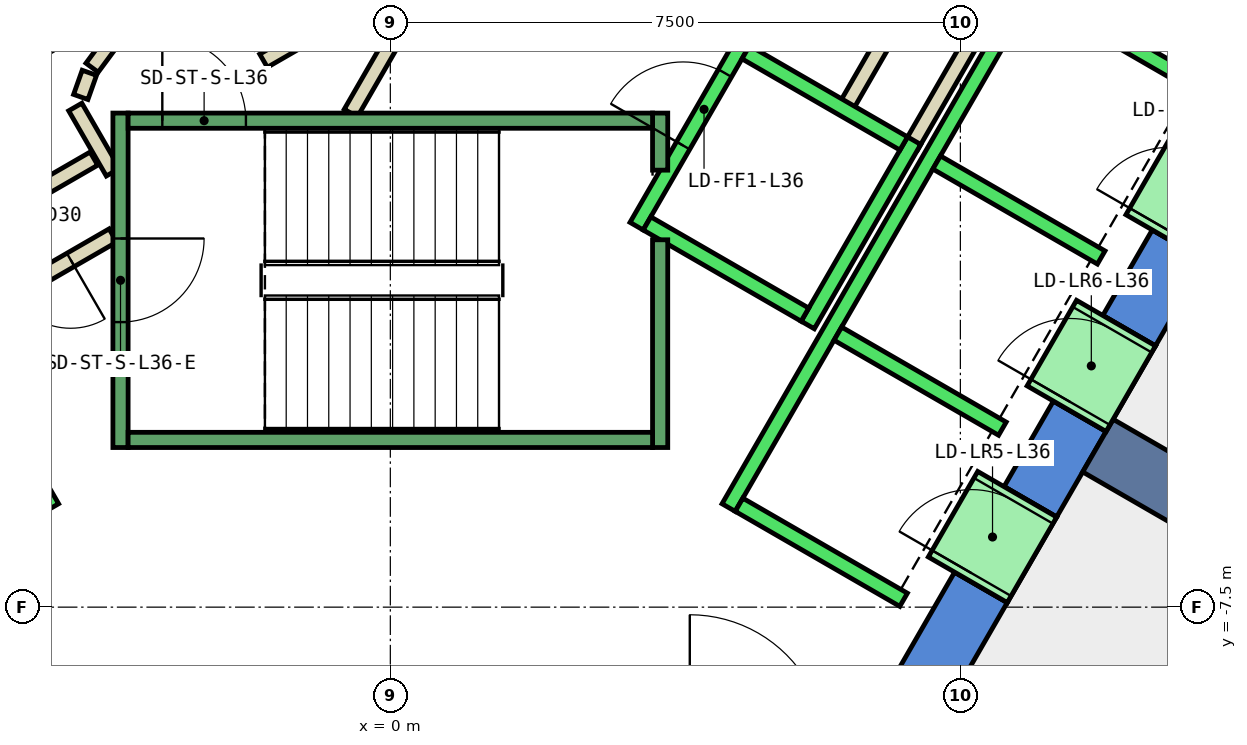
"""IFC4 building model, lengths in metres.
Left out: names, types, materials, properties, quantities, classifications, styles, units other than length and angle.
Written with IfcOpenShell. Run it as: python <this file> out.ifc"""

import sys

from ifc_helpers import new_model, si_unit, direction, frame, frame_2d, origin, place, context, subcontext, project, spatial, polyline, rectangle, outline, extrude, element, fill, save


model = new_model("IFC4")
c1 = context("Model", 3, precision=1e-05, world=origin(), true_north=direction((0.0, 1.0)))
c2 = subcontext(c1, "Body", "Model", "MODEL_VIEW")
j1 = project(units=[si_unit("LENGTHUNIT", "METRE"), si_unit("PLANEANGLEUNIT", "RADIAN")], contexts=[c1])
p1 = place(None, origin())
s1 = spatial("IfcSite", under=j1, at=p1, CompositionType="ELEMENT")
p2 = place(p1, origin())
s2 = spatial("IfcBuilding", under=s1, at=p2, CompositionType="ELEMENT")
p3 = place(p2, frame((0.0, 0.0, 163.4)))
s3 = spatial("IfcBuildingStorey", under=s2, at=p3, CompositionType="ELEMENT", Elevation=163.4)
p4 = place(p3, frame((0.0, 0.0, -0.4)))
e1 = element("IfcWall", 1, at=p4, inside=s3, PredefinedType="SHEAR", context=c2, shape_type="SweptSolid", body=[
    extrude(outline(polyline([(8.117, -7.44), (7.424, -7.04), (6.466, -8.7), (6.928, -9.5), (8.117, -7.44)])), origin(), (0.0, 0.0, 1.0), 4.2),
])
p5 = place(p3, frame((0.0, 0.0, -0.4)))
e2 = element("IfcWall", 2, at=p5, inside=s3, PredefinedType="SHEAR", context=c2, shape_type="SweptSolid", body=[
    extrude(outline(polyline([(9.417, -5.189), (8.724, -4.789), (8.075, -5.914), (8.767, -6.314), (9.417, -5.189)])), origin(), (0.0, 0.0, 1.0), 4.2),
])
p6 = place(p3, frame((0.0, 0.0, -0.4)))
e3 = element("IfcWall", 3, at=p6, inside=s3, PredefinedType="SHEAR", context=c2, shape_type="SweptSolid", body=[
    extrude(outline(polyline([(10.717, -2.937), (10.025, -2.537), (9.374, -3.663), (10.067, -4.063), (10.717, -2.937)])), origin(), (0.0, 0.0, 1.0), 4.2),
])
p7 = place(p3, frame((0.0, 0.0, 3.6)))
e4 = element("IfcWall", 4, at=p7, inside=s3, PredefinedType="SHEAR", context=c2, shape_type="SweptSolid", body=[
    extrude(outline(polyline([(8.767, -6.314), (8.075, -5.914), (7.424, -7.04), (8.117, -7.44), (8.767, -6.314)])), origin(), (0.0, 0.0, 1.0), 0.2),
])
p8 = place(p3, frame((0.0, 0.0, 3.6)))
e5 = element("IfcWall", 5, at=p8, inside=s3, PredefinedType="SHEAR", context=c2, shape_type="SweptSolid", body=[
    extrude(outline(polyline([(10.067, -4.063), (9.374, -3.663), (8.724, -4.789), (9.417, -5.189), (10.067, -4.063)])), origin(), (0.0, 0.0, 1.0), 0.2),
])
p9 = place(p3, frame((0.0, 0.0, 3.6)))
e6 = element("IfcWall", 6, at=p9, inside=s3, PredefinedType="SHEAR", context=c2, shape_type="SweptSolid", body=[
    extrude(outline(polyline([(11.367, -1.811), (10.675, -1.411), (10.025, -2.537), (10.717, -2.937), (11.367, -1.811)])), origin(), (0.0, 0.0, 1.0), 0.2),
])
p10 = place(p3, frame((9.31, -5.375, -0.4), z_axis=(0.0, 0.0, 1.0), x_axis=(0.866017533419, -0.500013631625, 0.0)))
e7 = element("IfcWall", 7, at=p10, inside=s3, PredefinedType="SHEAR", context=c2, shape_type="SweptSolid", body=[
    extrude(rectangle(XDim=9.0, YDim=0.8, at=frame_2d((4.5, 0.0))), origin(), (0.0, 0.0, 1.0), 4.2),
])
p11 = place(p3, frame((6.826, 0.522, 0.0), z_axis=(0.0, 0.0, 1.0), x_axis=(-0.500016722714, -0.866015748706, 0.0)))
e8 = element("IfcWall", 8, at=p11, inside=s3, PredefinedType="PARTITIONING", context=c2, shape_type="SweptSolid", body=[
    extrude(rectangle(XDim=1.7, YDim=0.2, at=frame_2d((0.85, 0.0))), origin(), (0.0, 0.0, 1.0), 3.8),
])
p12 = place(p3, frame((8.192, 0.888, 0.0), z_axis=(0.0, 0.0, 1.0), x_axis=(-0.499940625693, -0.866059680843, 0.0)))
e9 = element("IfcWall", 9, at=p12, inside=s3, PredefinedType="PARTITIONING", context=c2, shape_type="SweptSolid", body=[
    extrude(rectangle(XDim=2.68, YDim=0.2, at=frame_2d((1.34, 0.0))), origin(), (0.0, 0.0, 1.0), 3.8),
])
p13 = place(p3, frame((-3.9, -1.599, 0.0), z_axis=(0.0, 0.0, 1.0), x_axis=(-0.865969445389, -0.500096910261, 0.0)))
e10 = element("IfcWall", 10, at=p13, inside=s3, PredefinedType="PARTITIONING", context=c2, shape_type="SweptSolid", body=[
    extrude(rectangle(XDim=1.373, YDim=0.2, at=frame_2d((0.687, 0.0))), origin(), (0.0, 0.0, 1.0), 3.8),
])
p14 = place(p3, frame((-3.65, -2.61, 0.0), z_axis=(0.0, 0.0, 1.0), x_axis=(-0.866072462134, -0.499918483688, 0.0)))
e11 = element("IfcWall", 11, at=p14, inside=s3, PredefinedType="PARTITIONING", context=c2, shape_type="SweptSolid", body=[
    extrude(rectangle(XDim=2.084, YDim=0.2, at=frame_2d((1.042, 0.0))), origin(), (0.0, 0.0, 1.0), 3.8),
])
p15 = place(p14, frame((0.642, 0.0, 0.0)))
e12 = element("IfcOpeningElement", 12, at=p15, cuts=e11, PredefinedType="OPENING", context=c2, shape_type="SweptSolid", body=[
    extrude(rectangle(XDim=0.9, YDim=2.1, at=frame_2d((0.45, 1.05))), frame((0.0, 0.11, 0.0), z_axis=(0.0, -1.0, 0.0), x_axis=(1.0, 0.0, 0.0)), (0.0, 0.0, 1.0), 0.22),
])
p16 = place(p3, frame((-4.145, -0.92, 0.0), z_axis=(0.0, 0.0, 1.0), x_axis=(0.499743786207, -0.866173278362, 0.0)))
e13 = element("IfcWall", 13, at=p16, inside=s3, PredefinedType="PARTITIONING", context=c2, shape_type="SweptSolid", body=[
    extrude(rectangle(XDim=0.991, YDim=0.2, at=frame_2d((0.495, 0.0))), origin(), (0.0, 0.0, 1.0), 3.8),
])
p17 = place(p3, frame((-0.52, -1.0, 0.0), z_axis=(0.0, 0.0, 1.0), x_axis=(0.50011622646, 0.865958290007, 0.0)))
e14 = element("IfcWall", 14, at=p17, inside=s3, PredefinedType="PARTITIONING", context=c2, shape_type="SweptSolid", body=[
    extrude(rectangle(XDim=4.991, YDim=0.2, at=frame_2d((2.496, 0.0))), origin(), (0.0, 0.0, 1.0), 3.8),
])
p18 = place(p17, frame((1.945, 0.0, 0.0)))
e15 = element("IfcOpeningElement", 15, at=p18, cuts=e14, PredefinedType="OPENING", context=c2, shape_type="SweptSolid", body=[
    extrude(rectangle(XDim=1.0, YDim=2.1, at=frame_2d((0.5, 1.05))), frame((0.0, 0.11, 0.0), z_axis=(0.0, -1.0, 0.0), x_axis=(1.0, 0.0, 0.0)), (0.0, 0.0, 1.0), 0.22),
])
p19 = place(p3, frame((-0.412, 0.414, 0.0), z_axis=(0.0, 0.0, 1.0), x_axis=(-0.866017369001, -0.500013916395, 0.0)))
e16 = element("IfcWall", 16, at=p19, inside=s3, PredefinedType="PARTITIONING", context=c2, shape_type="SweptSolid", body=[
    extrude(rectangle(XDim=1.45, YDim=0.2, at=frame_2d((0.725, 0.0))), origin(), (0.0, 0.0, 1.0), 3.8),
])
p20 = place(p3, frame((-3.723, -0.131, 0.0), z_axis=(0.0, 0.0, 1.0), x_axis=(-0.594675113454, -0.803966112121, 0.0)))
e17 = element("IfcWall", 17, at=p20, inside=s3, PredefinedType="PARTITIONING", context=c2, shape_type="SweptSolid", body=[
    extrude(rectangle(XDim=0.338, YDim=0.2, at=frame_2d((0.169, 0.0))), origin(), (0.0, 0.0, 1.0), 3.8),
])
p21 = place(p3, frame((-3.96, -0.47, 0.0), z_axis=(0.0, 0.0, 1.0), x_axis=(-0.334824194261, -0.942280615813, 0.0)))
e18 = element("IfcWall", 18, at=p21, inside=s3, PredefinedType="PARTITIONING", context=c2, shape_type="SweptSolid", body=[
    extrude(rectangle(XDim=0.338, YDim=0.2, at=frame_2d((0.169, 0.0))), origin(), (0.0, 0.0, 1.0), 3.8),
])
p22 = place(p3, frame((12.401, -7.621, 0.0), z_axis=(0.0, 0.0, 1.0), x_axis=(-0.499983724212, -0.866034800411, 0.0)))
e19 = element("IfcWall", 19, at=p22, inside=s3, PredefinedType="PARTITIONING", context=c2, shape_type="SweptSolid", body=[
    extrude(rectangle(XDim=9.302, YDim=0.2, at=frame_2d((4.651, 0.0))), origin(), (0.0, 0.0, 1.0), 3.8),
])
p23 = place(p3, frame((-9.751, 2.99, 0.0), z_axis=(0.0, 0.0, 1.0), x_axis=(0.50000090737, -0.866024879913, 0.0)))
e20 = element("IfcWall", 20, at=p23, inside=s3, PredefinedType="STANDARD", context=c2, shape_type="SweptSolid", body=[
    extrude(rectangle(XDim=10.6, YDim=0.2, at=frame_2d((5.3, 0.0))), origin(), (0.0, 0.0, 1.0), 3.8),
])
p24 = place(p3, frame((3.24, -2.488, 0.0), z_axis=(0.0, 0.0, 1.0), x_axis=(0.49994636267, 0.866056369097, 0.0)))
e21 = element("IfcWall", 21, at=p24, inside=s3, PredefinedType="STANDARD", context=c2, shape_type="SweptSolid", body=[
    extrude(rectangle(XDim=2.8, YDim=0.2, at=frame_2d((1.4, 0.0))), origin(), (0.0, 0.0, 1.0), 3.8),
])
p25 = place(p24, frame((1.225, 0.0, 0.0)))
e22 = element("IfcOpeningElement", 22, at=p25, cuts=e21, PredefinedType="OPENING", context=c2, shape_type="SweptSolid", body=[
    extrude(rectangle(XDim=1.1, YDim=2.1, at=frame_2d((0.55, 1.05))), frame((0.0, 0.11, 0.0), z_axis=(0.0, -1.0, 0.0), x_axis=(1.0, 0.0, 0.0)), (0.0, 0.0, 1.0), 0.22),
])
p26 = place(p3, frame((5.492, -3.788, 0.0), z_axis=(0.0, 0.0, 1.0), x_axis=(0.500011755427, 0.866018616679, 0.0)))
e23 = element("IfcWall", 23, at=p26, inside=s3, PredefinedType="STANDARD", context=c2, shape_type="SweptSolid", body=[
    extrude(rectangle(XDim=2.8, YDim=0.2, at=frame_2d((1.4, 0.0))), origin(), (0.0, 0.0, 1.0), 3.8),
])
p27 = place(p3, frame((3.377, -2.452, 0.0), z_axis=(0.0, 0.0, 1.0), x_axis=(0.865955154139, -0.50012165622, 0.0)))
e24 = element("IfcWall", 24, at=p27, inside=s3, PredefinedType="STANDARD", context=c2, shape_type="SweptSolid", body=[
    extrude(rectangle(XDim=2.4, YDim=0.2, at=frame_2d((1.2, 0.0))), origin(), (0.0, 0.0, 1.0), 3.8),
])
p28 = place(p3, frame((4.677, -0.2, 0.0), z_axis=(0.0, 0.0, 1.0), x_axis=(0.865973769406, -0.500089422704, 0.0)))
e25 = element("IfcWall", 25, at=p28, inside=s3, PredefinedType="STANDARD", context=c2, shape_type="SweptSolid", body=[
    extrude(rectangle(XDim=2.399, YDim=0.2, at=frame_2d((1.2, 0.0))), origin(), (0.0, 0.0, 1.0), 3.8),
])
p29 = place(p3, frame((4.451, -6.19, 0.0), z_axis=(0.0, 0.0, 1.0), x_axis=(0.50000090737, 0.866024879913, 0.0)))
e26 = element("IfcWall", 26, at=p29, inside=s3, PredefinedType="STANDARD", context=c2, shape_type="SweptSolid", body=[
    extrude(rectangle(XDim=10.6, YDim=0.2, at=frame_2d((5.3, 0.0))), origin(), (0.0, 0.0, 1.0), 3.8),
])
for number, where, z_axis, x_axis in (
    (27, (4.588, -6.153, 0.0), (0.0, 0.0, 1.0), (0.866, -0.5, 0.0)),
    (28, (5.888, -3.902, 0.0), (0.0, 0.0, 1.0), (0.866, -0.5, 0.0)),
    (29, (7.188, -1.65, 0.0), (0.0, 0.0, 1.0), (0.866, -0.5, 0.0)),
    (30, (8.488, 0.602, 0.0), (0.0, 0.0, 1.0), (0.866, -0.5, 0.0)),
):
    element("IfcWall", number, at=place(p3, frame(where, z_axis=z_axis, x_axis=x_axis)), inside=s3, PredefinedType="STANDARD", context=c2, shape_type="SweptSolid", body=[
        extrude(rectangle(XDim=2.5, YDim=0.2, at=frame_2d((1.25, 0.0))), origin(), (0.0, 0.0, 1.0), 3.8),
    ])
p30 = place(p3, frame((7.598, -7.14, 0.0), z_axis=(0.0, 0.0, 1.0), x_axis=(0.500362116554, 0.865816234728, 0.0)))
e31 = element("IfcWall", 31, at=p30, inside=s3, PredefinedType="STANDARD", context=c2, shape_type="SweptSolid", body=[
    extrude(rectangle(XDim=1.299, YDim=1.2, at=frame_2d((0.65, 0.0))), origin(), (0.0, 0.0, 1.0), 2.4),
])
p31 = place(p30, frame((0.1, 0.0, 0.0)))
e32 = element("IfcOpeningElement", 32, at=p31, cuts=e31, PredefinedType="OPENING", context=c2, shape_type="SweptSolid", body=[
    extrude(rectangle(XDim=1.1, YDim=2.3, at=frame_2d((0.55, 1.15))), frame((0.0, 0.61, 0.0), z_axis=(0.0, -1.0, 0.0), x_axis=(1.0, 0.0, 0.0)), (0.0, 0.0, 1.0), 1.22),
])
p32 = place(p3, frame((8.898, -4.889, 0.0), z_axis=(0.0, 0.0, 1.0), x_axis=(0.500036693733, 0.866004217611, 0.0)))
e33 = element("IfcWall", 33, at=p32, inside=s3, PredefinedType="STANDARD", context=c2, shape_type="SweptSolid", body=[
    extrude(rectangle(XDim=1.3, YDim=1.2, at=frame_2d((0.65, 0.0))), origin(), (0.0, 0.0, 1.0), 2.4),
])
p33 = place(p32, frame((0.1, 0.0, 0.0)))
e34 = element("IfcOpeningElement", 34, at=p33, cuts=e33, PredefinedType="OPENING", context=c2, shape_type="SweptSolid", body=[
    extrude(rectangle(XDim=1.1, YDim=2.3, at=frame_2d((0.55, 1.15))), frame((0.0, 0.61, 0.0), z_axis=(0.0, -1.0, 0.0), x_axis=(1.0, 0.0, 0.0)), (0.0, 0.0, 1.0), 1.22),
])
p34 = place(p3, frame((10.198, -2.637, 0.0), z_axis=(0.0, 0.0, 1.0), x_axis=(0.49989585183, 0.866085525409, 0.0)))
e35 = element("IfcWall", 35, at=p34, inside=s3, PredefinedType="STANDARD", context=c2, shape_type="SweptSolid", body=[
    extrude(rectangle(XDim=1.3, YDim=1.2, at=frame_2d((0.65, 0.0))), origin(), (0.0, 0.0, 1.0), 2.4),
])
p35 = place(p34, frame((0.1, 0.0, 0.0)))
e36 = element("IfcOpeningElement", 36, at=p35, cuts=e35, PredefinedType="OPENING", context=c2, shape_type="SweptSolid", body=[
    extrude(rectangle(XDim=1.1, YDim=2.3, at=frame_2d((0.55, 1.15))), frame((0.0, 0.61, 0.0), z_axis=(0.0, -1.0, 0.0), x_axis=(1.0, 0.0, 0.0)), (0.0, 0.0, 1.0), 1.22),
])
p36 = place(p3, frame((-3.55, -1.0, 0.0), z_axis=(0.0, 0.0, 1.0), x_axis=(0.0, -1.0, 0.0)))
e37 = element("IfcWall", 37, at=p36, inside=s3, PredefinedType="STANDARD", context=c2, shape_type="SweptSolid", body=[
    extrude(rectangle(XDim=4.4, YDim=0.2, at=frame_2d((2.2, 0.0))), origin(), (0.0, 0.0, 1.0), 3.8),
])
p37 = place(p36, frame((1.65, 0.0, 0.0)))
e38 = element("IfcOpeningElement", 38, at=p37, cuts=e37, PredefinedType="OPENING", context=c2, shape_type="SweptSolid", body=[
    extrude(rectangle(XDim=1.1, YDim=2.2, at=frame_2d((0.55, 1.1))), frame((0.0, 0.11, 0.0), z_axis=(0.0, -1.0, 0.0), x_axis=(1.0, 0.0, 0.0)), (0.0, 0.0, 1.0), 0.22),
])
p38 = place(p3, frame((3.55, -2.667, 0.0), z_axis=(0.0, 0.0, 1.0), x_axis=(0.0, -1.0, 0.0)))
e39 = element("IfcWall", 39, at=p38, inside=s3, PredefinedType="STANDARD", context=c2, shape_type="SweptSolid", body=[
    extrude(rectangle(XDim=2.733, YDim=0.2, at=frame_2d((1.366, 0.0))), origin(), (0.0, 0.0, 1.0), 3.8),
])
p39 = place(p3, frame((3.55, -1.0, 0.0), z_axis=(0.0, 0.0, 1.0), x_axis=(0.0, -1.0, 0.0)))
e40 = element("IfcWall", 40, at=p39, inside=s3, PredefinedType="STANDARD", context=c2, shape_type="SweptSolid", body=[
    extrude(rectangle(XDim=0.751, YDim=0.2, at=frame_2d((0.375, 0.0))), origin(), (0.0, 0.0, 1.0), 3.8),
])
p40 = place(p3, frame((-3.45, -1.1, 0.0), z_axis=(0.0, 0.0, 1.0), x_axis=(1.0, 0.0, 0.0)))
e41 = element("IfcWall", 41, at=p40, inside=s3, PredefinedType="STANDARD", context=c2, shape_type="SweptSolid", body=[
    extrude(rectangle(XDim=6.9, YDim=0.2, at=frame_2d((3.45, 0.0))), origin(), (0.0, 0.0, 1.0), 3.8),
])
p41 = place(p40, frame((0.45, 0.0, 0.0)))
e42 = element("IfcOpeningElement", 42, at=p41, cuts=e41, PredefinedType="OPENING", context=c2, shape_type="SweptSolid", body=[
    extrude(rectangle(XDim=1.1, YDim=2.2, at=frame_2d((0.55, 1.1))), frame((0.0, 0.11, 0.0), z_axis=(0.0, -1.0, 0.0), x_axis=(1.0, 0.0, 0.0)), (0.0, 0.0, 1.0), 0.22),
])
p42 = place(p3, frame((-3.45, -5.3, 0.0), z_axis=(0.0, 0.0, 1.0), x_axis=(1.0, 0.0, 0.0)))
e43 = element("IfcWall", 43, at=p42, inside=s3, PredefinedType="STANDARD", context=c2, shape_type="SweptSolid", body=[
    extrude(rectangle(XDim=6.9, YDim=0.2, at=frame_2d((3.45, 0.0))), origin(), (0.0, 0.0, 1.0), 3.8),
])
p43 = place(p15, origin())
e44 = element("IfcDoor", 44, at=p43, inside=s3, OperationType="SINGLE_SWING_LEFT", PredefinedType="DOOR", context=c2, shape_type="SweptSolid", body=[
    extrude(rectangle(XDim=0.9, YDim=2.1, at=frame_2d((0.45, 1.05))), frame((0.0, 0.025, 0.0), z_axis=(0.0, -1.0, 0.0), x_axis=(1.0, 0.0, 0.0)), (0.0, 0.0, 1.0), 0.05),
])
fill(e12, e44)
p44 = place(p31, origin())
e45 = element("IfcDoor", 45, at=p44, inside=s3, OperationType="SLIDING_TO_LEFT", PredefinedType="DOOR", context=c2, shape_type="SweptSolid", body=[
    extrude(rectangle(XDim=1.1, YDim=2.3, at=frame_2d((0.55, 1.15))), frame((0.0, 0.025, 0.0), z_axis=(0.0, -1.0, 0.0), x_axis=(1.0, 0.0, 0.0)), (0.0, 0.0, 1.0), 0.05),
])
fill(e32, e45)
p45 = place(p33, origin())
e46 = element("IfcDoor", 46, at=p45, inside=s3, OperationType="SLIDING_TO_LEFT", PredefinedType="DOOR", context=c2, shape_type="SweptSolid", body=[
    extrude(rectangle(XDim=1.1, YDim=2.3, at=frame_2d((0.55, 1.15))), frame((0.0, 0.025, 0.0), z_axis=(0.0, -1.0, 0.0), x_axis=(1.0, 0.0, 0.0)), (0.0, 0.0, 1.0), 0.05),
])
fill(e34, e46)
p46 = place(p25, origin())
e47 = element("IfcDoor", 47, at=p46, inside=s3, OperationType="SLIDING_TO_LEFT", PredefinedType="DOOR", context=c2, shape_type="SweptSolid", body=[
    extrude(rectangle(XDim=1.1, YDim=2.1, at=frame_2d((0.55, 1.05))), frame((0.0, 0.025, 0.0), z_axis=(0.0, -1.0, 0.0), x_axis=(1.0, 0.0, 0.0)), (0.0, 0.0, 1.0), 0.05),
])
fill(e22, e47)
p47 = place(p41, origin())
e48 = element("IfcDoor", 48, at=p47, inside=s3, OperationType="SINGLE_SWING_LEFT", PredefinedType="DOOR", context=c2, shape_type="SweptSolid", body=[
    extrude(rectangle(XDim=1.1, YDim=2.2, at=frame_2d((0.55, 1.1))), frame((0.0, 0.025, 0.0), z_axis=(0.0, -1.0, 0.0), x_axis=(1.0, 0.0, 0.0)), (0.0, 0.0, 1.0), 0.05),
])
fill(e42, e48)
p48 = place(p37, origin())
e49 = element("IfcDoor", 49, at=p48, inside=s3, OperationType="SINGLE_SWING_LEFT", PredefinedType="DOOR", context=c2, shape_type="SweptSolid", body=[
    extrude(rectangle(XDim=1.1, YDim=2.2, at=frame_2d((0.55, 1.1))), frame((0.0, 0.025, 0.0), z_axis=(0.0, -1.0, 0.0), x_axis=(1.0, 0.0, 0.0)), (0.0, 0.0, 1.0), 0.05),
])
fill(e38, e49)
save(model, sys.argv[1])
